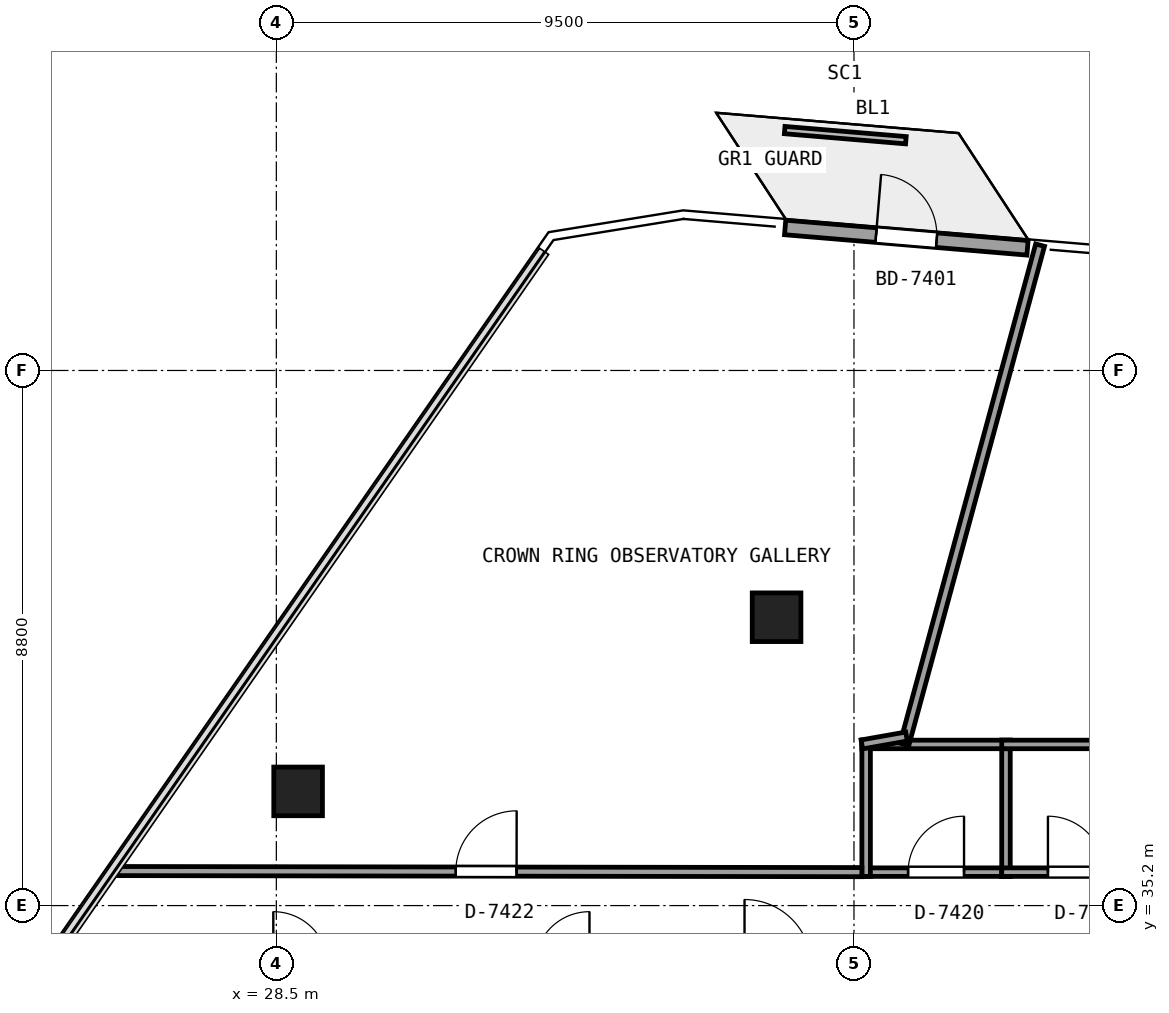
"""IFC4 building model, lengths in metres.
Left out: names, types, materials, properties, quantities, classifications, styles, units other than length and angle.
Written with IfcOpenShell. Run it as: python <this file> out.ifc"""

import sys

from ifc_helpers import new_model, si_unit, direction, frame, frame_2d, origin, origin_2d, place, context, subcontext, project, spatial, rectangle, extrude, element, fill, save


model = new_model("IFC4")
c1 = context("Model", 3, precision=1e-05, world=origin(), true_north=direction((0.0, 1.0)))
c2 = subcontext(c1, "Body", "Model", "MODEL_VIEW")
j1 = project(units=[si_unit("LENGTHUNIT", "METRE"), si_unit("PLANEANGLEUNIT", "RADIAN")], contexts=[c1])
p1 = place(None, origin())
s1 = spatial("IfcSite", under=j1, at=p1, CompositionType="ELEMENT")
p2 = place(p1, origin())
s2 = spatial("IfcBuilding", under=s1, at=p2, CompositionType="ELEMENT")
p3 = place(p2, frame((0.0, 0.0, 275.1)))
s3 = spatial("IfcBuildingStorey", under=s2, at=p3, CompositionType="ELEMENT", Elevation=275.1)
for number, where, z_axis, x_axis in (
    (1, (36.727, 39.942, 0.0), (0.0, 0.0, 1.0), (1.0, 0.0, 0.0)),
    (2, (28.858, 37.078, 0.0), (0.0, 0.0, 1.0), (1.0, 0.0, 0.0)),
):
    element("IfcColumn", number, at=place(p3, frame(where, z_axis=z_axis, x_axis=x_axis)), inside=s3, PredefinedType="COLUMN", context=c2, shape_type="SweptSolid", body=[
        extrude(rectangle(XDim=0.8, YDim=0.8, at=origin_2d()), origin(), (0.0, 0.0, 1.0), 3.92),
    ])
p4 = place(p3, frame((36.868, 46.352, 0.0), z_axis=(0.0, 0.0, 1.0), x_axis=(0.996487852209, -0.083737449209, 0.0)))
e3 = element("IfcWall", 3, at=p4, inside=s3, PredefinedType="SOLIDWALL", context=c2, shape_type="SweptSolid", body=[
    extrude(rectangle(XDim=4.0, YDim=0.24, at=frame_2d((2.0, 0.0))), origin(), (0.0, 0.0, 1.0), 3.92),
])
p5 = place(p4, frame((1.5, 0.0, 0.0)))
e4 = element("IfcOpeningElement", 4, at=p5, cuts=e3, PredefinedType="OPENING", context=c2, shape_type="SweptSolid", body=[
    extrude(rectangle(XDim=1.0, YDim=2.15, at=frame_2d((0.5, 1.075))), frame((0.0, 0.13, 0.0), z_axis=(0.0, -1.0, 0.0), x_axis=(1.0, 0.0, 0.0)), (0.0, 0.0, 1.0), 0.26),
])
p6 = place(p3, frame((38.13, 35.75, 0.0), z_axis=(0.0, 0.0, 1.0), x_axis=(1.0, 0.0, 0.0)))
e5 = element("IfcWall", 5, at=p6, inside=s3, PredefinedType="PARTITIONING", context=c2, shape_type="SweptSolid", body=[
    extrude(rectangle(XDim=2.44, YDim=0.14, at=frame_2d((1.22, 0.0))), origin(), (0.0, 0.0, 1.0), 3.441),
])
p7 = place(p6, frame((0.76, 0.0, 0.0)))
e6 = element("IfcOpeningElement", 6, at=p7, cuts=e5, PredefinedType="OPENING", context=c2, shape_type="SweptSolid", body=[
    extrude(rectangle(XDim=0.92, YDim=2.1, at=frame_2d((0.46, 1.05))), frame((0.0, 0.08, 0.0), z_axis=(0.0, -1.0, 0.0), x_axis=(1.0, 0.0, 0.0)), (0.0, 0.0, 1.0), 0.16),
])
p8 = place(p3, frame((40.5, 35.68, 0.0), z_axis=(0.0, 0.0, 1.0), x_axis=(0.0, 1.0, 0.0)))
e7 = element("IfcWall", 7, at=p8, inside=s3, PredefinedType="PARTITIONING", context=c2, shape_type="SweptSolid", body=[
    extrude(rectangle(XDim=2.24, YDim=0.14, at=frame_2d((1.12, 0.0))), origin(), (0.0, 0.0, 1.0), 3.549),
])
p9 = place(p3, frame((40.57, 37.85, 0.0), z_axis=(0.0, 0.0, 1.0), x_axis=(-1.0, 0.0, 0.0)))
e8 = element("IfcWall", 8, at=p9, inside=s3, PredefinedType="PARTITIONING", context=c2, shape_type="SweptSolid", body=[
    extrude(rectangle(XDim=2.44, YDim=0.14, at=frame_2d((1.22, 0.0))), origin(), (0.0, 0.0, 1.0), 3.441),
])
p10 = place(p3, frame((38.2, 37.92, 0.0), z_axis=(0.0, 0.0, 1.0), x_axis=(0.0, -1.0, 0.0)))
e9 = element("IfcWall", 9, at=p10, inside=s3, PredefinedType="PARTITIONING", context=c2, shape_type="SweptSolid", body=[
    extrude(rectangle(XDim=2.24, YDim=0.14, at=frame_2d((1.12, 0.0))), origin(), (0.0, 0.0, 1.0), 3.549),
])
p11 = place(p3, frame((40.43, 35.75, 0.0), z_axis=(0.0, 0.0, 1.0), x_axis=(1.0, 0.0, 0.0)))
e10 = element("IfcWall", 10, at=p11, inside=s3, PredefinedType="PARTITIONING", context=c2, shape_type="SweptSolid", body=[
    extrude(rectangle(XDim=2.44, YDim=0.14, at=frame_2d((1.22, 0.0))), origin(), (0.0, 0.0, 1.0), 3.441),
])
p12 = place(p11, frame((0.76, 0.0, 0.0)))
e11 = element("IfcOpeningElement", 11, at=p12, cuts=e10, PredefinedType="OPENING", context=c2, shape_type="SweptSolid", body=[
    extrude(rectangle(XDim=0.92, YDim=2.1, at=frame_2d((0.46, 1.05))), frame((0.0, 0.08, 0.0), z_axis=(0.0, -1.0, 0.0), x_axis=(1.0, 0.0, 0.0)), (0.0, 0.0, 1.0), 0.16),
])
p13 = place(p3, frame((42.87, 37.85, 0.0), z_axis=(0.0, 0.0, 1.0), x_axis=(-1.0, 0.0, 0.0)))
e12 = element("IfcWall", 12, at=p13, inside=s3, PredefinedType="PARTITIONING", context=c2, shape_type="SweptSolid", body=[
    extrude(rectangle(XDim=2.44, YDim=0.14, at=frame_2d((1.22, 0.0))), origin(), (0.0, 0.0, 1.0), 3.441),
])
p14 = place(p3, frame((38.829, 37.85, 0.0), z_axis=(0.0, 0.0, 1.0), x_axis=(0.262306419942, 0.964984633068, 0.0)))
e13 = element("IfcWall", 13, at=p14, inside=s3, PredefinedType="PARTITIONING", context=c2, shape_type="SweptSolid", body=[
    extrude(rectangle(XDim=8.509, YDim=0.15, at=frame_2d((4.254, 0.0))), origin(), (0.0, 0.0, 1.0), 3.445),
])
p15 = place(p3, frame((25.772, 35.768, 0.0), z_axis=(0.0, 0.0, 1.0), x_axis=(0.999998931381, -0.001461928976, 0.0)))
e14 = element("IfcWall", 14, at=p15, inside=s3, PredefinedType="PARTITIONING", context=c2, shape_type="SweptSolid", body=[
    extrude(rectangle(XDim=12.358, YDim=0.15, at=frame_2d((6.179, 0.0))), origin(), (0.0, 0.0, 1.0), 3.365),
])
p16 = place(p15, frame((5.679, 0.0, 0.0)))
e15 = element("IfcOpeningElement", 15, at=p16, cuts=e14, PredefinedType="OPENING", context=c2, shape_type="SweptSolid", body=[
    extrude(rectangle(XDim=1.0, YDim=2.15, at=frame_2d((0.5, 1.075))), frame((0.0, 0.085, 0.0), z_axis=(0.0, -1.0, 0.0), x_axis=(1.0, 0.0, 0.0)), (0.0, 0.0, 1.0), 0.17),
])
p17 = place(p3, frame((38.13, 37.85, 0.0), z_axis=(0.0, 0.0, 1.0), x_axis=(0.984707641081, 0.174214986716, 0.0)))
e16 = element("IfcWall", 16, at=p17, inside=s3, PredefinedType="PARTITIONING", context=c2, shape_type="SweptSolid", body=[
    extrude(rectangle(XDim=0.746, YDim=0.15, at=frame_2d((0.373, 0.0))), origin(), (0.0, 0.0, 1.0), 3.92),
])
p18 = place(p5, origin())
e17 = element("IfcDoor", 17, at=p18, inside=s3, OperationType="SINGLE_SWING_LEFT", PredefinedType="DOOR", context=c2, shape_type="SweptSolid", body=[
    extrude(rectangle(XDim=1.0, YDim=2.15, at=frame_2d((0.5, 1.075))), frame((0.0, 0.025, 0.0), z_axis=(0.0, -1.0, 0.0), x_axis=(1.0, 0.0, 0.0)), (0.0, 0.0, 1.0), 0.05),
])
fill(e4, e17)
p19 = place(p7, origin())
e18 = element("IfcDoor", 18, at=p19, inside=s3, OperationType="SINGLE_SWING_RIGHT", PredefinedType="DOOR", context=c2, shape_type="SweptSolid", body=[
    extrude(rectangle(XDim=0.92, YDim=2.1, at=frame_2d((0.46, 1.05))), frame((0.0, 0.025, 0.0), z_axis=(0.0, -1.0, 0.0), x_axis=(1.0, 0.0, 0.0)), (0.0, 0.0, 1.0), 0.05),
])
fill(e6, e18)
p20 = place(p12, origin())
e19 = element("IfcDoor", 19, at=p20, inside=s3, OperationType="SINGLE_SWING_LEFT", PredefinedType="DOOR", context=c2, shape_type="SweptSolid", body=[
    extrude(rectangle(XDim=0.92, YDim=2.1, at=frame_2d((0.46, 1.05))), frame((0.0, 0.025, 0.0), z_axis=(0.0, -1.0, 0.0), x_axis=(1.0, 0.0, 0.0)), (0.0, 0.0, 1.0), 0.05),
])
fill(e11, e19)
p21 = place(p16, origin())
e20 = element("IfcDoor", 20, at=p21, inside=s3, OperationType="SINGLE_SWING_RIGHT", PredefinedType="DOOR", context=c2, shape_type="SweptSolid", body=[
    extrude(rectangle(XDim=1.0, YDim=2.15, at=frame_2d((0.5, 1.075))), frame((0.0, 0.025, 0.0), z_axis=(0.0, -1.0, 0.0), x_axis=(1.0, 0.0, 0.0)), (0.0, 0.0, 1.0), 0.05),
])
fill(e15, e20)
save(model, sys.argv[1])
